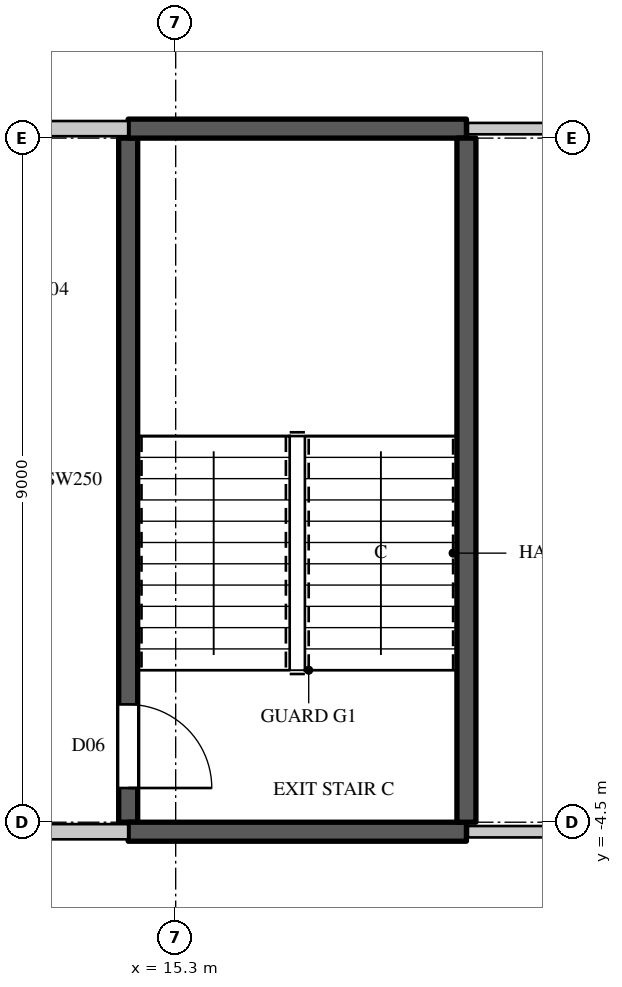
"""IFC4 building model, lengths in metres.
Left out: names, types, materials, properties, quantities, classifications, styles, units other than length and angle.
Written with IfcOpenShell. Run it as: python <this file> out.ifc"""

import sys

from ifc_helpers import new_model, si_unit, direction, frame, frame_2d, origin, place, context, subcontext, project, spatial, rectangle, extrude, element, fill, save


model = new_model("IFC4")
c1 = context("Model", 3, precision=1e-05, world=origin(), true_north=direction((0.0, 1.0)))
c2 = subcontext(c1, "Body", "Model", "MODEL_VIEW")
j1 = project(units=[si_unit("LENGTHUNIT", "METRE"), si_unit("PLANEANGLEUNIT", "RADIAN")], contexts=[c1])
p1 = place(None, origin())
s1 = spatial("IfcSite", under=j1, at=p1, CompositionType="ELEMENT")
p2 = place(p1, origin())
s2 = spatial("IfcBuilding", under=s1, at=p2, CompositionType="ELEMENT")
p3 = place(p2, frame((0.0, 0.0, 296.7)))
s3 = spatial("IfcBuildingStorey", under=s2, at=p3, CompositionType="ELEMENT", Elevation=296.7)
for number, where, z_axis, x_axis in (
    (1, (10.7, -4.625, 0.0), (0.0, 0.0, 1.0), (1.0, 0.0, 0.0)),
    (2, (10.7, 4.625, 0.0), (0.0, 0.0, 1.0), (1.0, 0.0, 0.0)),
):
    element("IfcWall", number, at=place(p3, frame(where, z_axis=z_axis, x_axis=x_axis)), inside=s3, PredefinedType="PARTITIONING", context=c2, shape_type="SweptSolid", body=[
        extrude(rectangle(XDim=3.975, YDim=0.2, at=frame_2d((1.988, 0.0))), origin(), (0.0, 0.0, 1.0), 3.8),
    ])
for number, where, z_axis, x_axis in (
    (3, (19.145, -4.625, 0.0), (0.0, 0.0, 1.0), (1.0, 0.0, 0.0)),
    (4, (19.145, 4.625, 0.0), (0.0, 0.0, 1.0), (1.0, 0.0, 0.0)),
):
    element("IfcWall", number, at=place(p3, frame(where, z_axis=z_axis, x_axis=x_axis)), inside=s3, PredefinedType="PARTITIONING", context=c2, shape_type="SweptSolid", body=[
        extrude(rectangle(XDim=4.605, YDim=0.15, at=frame_2d((2.302, 0.0))), origin(), (0.0, 0.0, 1.0), 3.8),
    ])
p4 = place(p3, frame((14.675, -4.5, 0.0), z_axis=(0.0, 0.0, 1.0), x_axis=(0.0, 1.0, 0.0)))
e5 = element("IfcWall", 5, at=p4, inside=s3, PredefinedType="SHEAR", context=c2, shape_type="SweptSolid", body=[
    extrude(rectangle(XDim=9.0, YDim=0.25, at=frame_2d((4.5, 0.0))), origin(), (0.0, 0.0, 1.0), 3.8),
])
p5 = place(p4, frame((0.45, 0.0, 0.0)))
e6 = element("IfcOpeningElement", 6, at=p5, cuts=e5, PredefinedType="OPENING", context=c2, shape_type="SweptSolid", body=[
    extrude(rectangle(XDim=1.1, YDim=2.2, at=frame_2d((0.55, 1.1))), frame((0.0, 0.135, 0.0), z_axis=(0.0, -1.0, 0.0), x_axis=(1.0, 0.0, 0.0)), (0.0, 0.0, 1.0), 0.27),
])
for number, where, z_axis, x_axis in (
    (7, (14.675, -4.625, 0.0), (0.0, 0.0, 1.0), (1.0, 0.0, 0.0)),
    (8, (14.675, 4.625, 0.0), (0.0, 0.0, 1.0), (1.0, 0.0, 0.0)),
):
    element("IfcWall", number, at=place(p3, frame(where, z_axis=z_axis, x_axis=x_axis)), inside=s3, PredefinedType="SHEAR", context=c2, shape_type="SweptSolid", body=[
        extrude(rectangle(XDim=4.45, YDim=0.25, at=frame_2d((2.225, 0.0))), origin(), (0.0, 0.0, 1.0), 3.8),
    ])
p6 = place(p3, frame((19.125, -4.5, 0.0), z_axis=(0.0, 0.0, 1.0), x_axis=(0.0, 1.0, 0.0)))
e9 = element("IfcWall", 9, at=p6, inside=s3, PredefinedType="SHEAR", context=c2, shape_type="SweptSolid", body=[
    extrude(rectangle(XDim=9.0, YDim=0.25, at=frame_2d((4.5, 0.0))), origin(), (0.0, 0.0, 1.0), 3.8),
])
p7 = place(p5, origin())
e10 = element("IfcDoor", 10, at=p7, inside=s3, OperationType="SINGLE_SWING_RIGHT", PredefinedType="DOOR", context=c2, shape_type="SweptSolid", body=[
    extrude(rectangle(XDim=1.1, YDim=2.2, at=frame_2d((0.55, 1.1))), frame((0.0, 0.025, 0.0), z_axis=(0.0, -1.0, 0.0), x_axis=(1.0, 0.0, 0.0)), (0.0, 0.0, 1.0), 0.05),
])
fill(e6, e10)
save(model, sys.argv[1])
